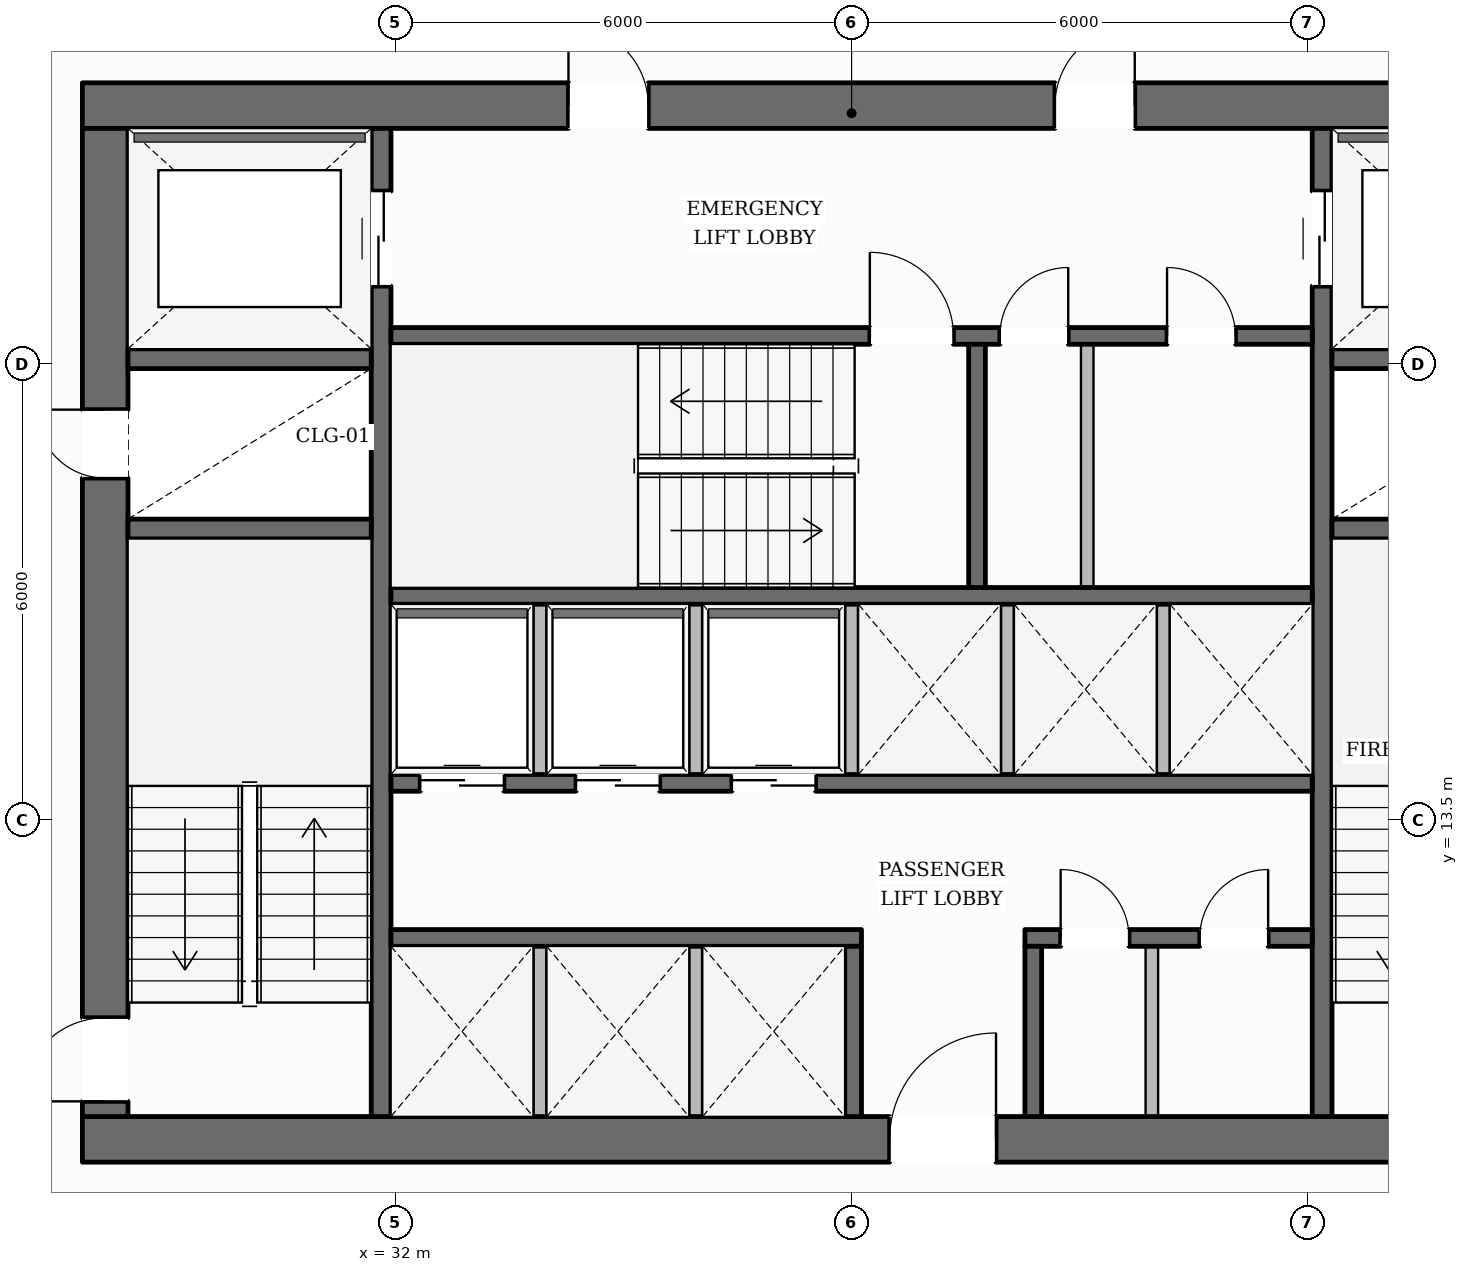
"""IFC4 building model, lengths in metres.
Left out: names, types, materials, properties, quantities, classifications, styles, units other than length and angle.
Written with IfcOpenShell. Run it as: python <this file> out.ifc"""

import sys

from ifc_helpers import new_model, si_unit, direction, frame, frame_2d, origin, place, context, subcontext, project, spatial, rectangle, extrude, element, fill, save


model = new_model("IFC4")
c1 = context("Model", 3, precision=1e-05, world=origin(), true_north=direction((0.0, 1.0)))
c2 = subcontext(c1, "Body", "Model", "MODEL_VIEW")
j1 = project(units=[si_unit("LENGTHUNIT", "METRE"), si_unit("PLANEANGLEUNIT", "RADIAN")], contexts=[c1])
p1 = place(None, origin())
s1 = spatial("IfcSite", under=j1, at=p1, CompositionType="ELEMENT")
p2 = place(p1, origin())
s2 = spatial("IfcBuilding", under=s1, at=p2, CompositionType="ELEMENT")
p3 = place(p2, frame((0.0, 0.0, 44.5)))
s3 = spatial("IfcBuildingStorey", under=s2, at=p3, CompositionType="ELEMENT", Elevation=44.5)
p4 = place(p3, frame((27.88, 9.3, 0.0), z_axis=(0.0, 0.0, 1.0), x_axis=(1.0, 0.0, 0.0)))
e1 = element("IfcWall", 1, at=p4, inside=s3, PredefinedType="SOLIDWALL", context=c2, shape_type="SweptSolid", body=[
    extrude(rectangle(XDim=20.24, YDim=0.6, at=frame_2d((10.12, 0.0))), origin(), (0.0, 0.0, 1.0), 3.59),
])
p5 = place(p4, frame((10.62, 0.0, 0.0)))
e2 = element("IfcOpeningElement", 2, at=p5, cuts=e1, PredefinedType="OPENING", context=c2, shape_type="SweptSolid", body=[
    extrude(rectangle(XDim=1.4, YDim=2.2, at=frame_2d((0.7, 1.1))), frame((0.0, 0.31, 0.0), z_axis=(0.0, -1.0, 0.0), x_axis=(1.0, 0.0, 0.0)), (0.0, 0.0, 1.0), 0.62),
])
p6 = place(p3, frame((27.88, 22.9, 0.0), z_axis=(0.0, 0.0, 1.0), x_axis=(1.0, 0.0, 0.0)))
e3 = element("IfcWall", 3, at=p6, inside=s3, PredefinedType="SOLIDWALL", context=c2, shape_type="SweptSolid", body=[
    extrude(rectangle(XDim=20.24, YDim=0.6, at=frame_2d((10.12, 0.0))), origin(), (0.0, 0.0, 1.0), 3.59),
])
p7 = place(p6, frame((6.395, 0.0, 0.0)))
e4 = element("IfcOpeningElement", 4, at=p7, cuts=e3, PredefinedType="OPENING", context=c2, shape_type="SweptSolid", body=[
    extrude(rectangle(XDim=1.05, YDim=2.15, at=frame_2d((0.525, 1.075))), frame((0.0, 0.31, 0.0), z_axis=(0.0, -1.0, 0.0), x_axis=(1.0, 0.0, 0.0)), (0.0, 0.0, 1.0), 0.62),
])
p8 = place(p6, frame((12.795, 0.0, 0.0)))
e5 = element("IfcOpeningElement", 5, at=p8, cuts=e3, PredefinedType="OPENING", context=c2, shape_type="SweptSolid", body=[
    extrude(rectangle(XDim=1.05, YDim=2.15, at=frame_2d((0.525, 1.075))), frame((0.0, 0.31, 0.0), z_axis=(0.0, -1.0, 0.0), x_axis=(1.0, 0.0, 0.0)), (0.0, 0.0, 1.0), 0.62),
])
p9 = place(p3, frame((28.18, 9.6, 0.0), z_axis=(0.0, 0.0, 1.0), x_axis=(0.0, 1.0, 0.0)))
e6 = element("IfcWall", 6, at=p9, inside=s3, PredefinedType="SOLIDWALL", context=c2, shape_type="SweptSolid", body=[
    extrude(rectangle(XDim=13.0, YDim=0.6, at=frame_2d((6.5, 0.0))), origin(), (0.0, 0.0, 1.0), 3.59),
])
p10 = place(p9, frame((0.2, 0.0, 0.0)))
e7 = element("IfcOpeningElement", 7, at=p10, cuts=e6, PredefinedType="OPENING", context=c2, shape_type="SweptSolid", body=[
    extrude(rectangle(XDim=1.1, YDim=2.15, at=frame_2d((0.55, 1.075))), frame((0.0, 0.31, 0.0), z_axis=(0.0, -1.0, 0.0), x_axis=(1.0, 0.0, 0.0)), (0.0, 0.0, 1.0), 0.62),
])
p11 = place(p9, frame((8.4, 0.0, 0.0)))
e8 = element("IfcOpeningElement", 8, at=p11, cuts=e6, PredefinedType="OPENING", context=c2, shape_type="SweptSolid", body=[
    extrude(rectangle(XDim=0.9, YDim=2.1, at=frame_2d((0.45, 1.05))), frame((0.0, 0.31, 0.0), z_axis=(0.0, -1.0, 0.0), x_axis=(1.0, 0.0, 0.0)), (0.0, 0.0, 1.0), 0.62),
])
p12 = place(p3, frame((31.81, 9.6, 0.0), z_axis=(0.0, 0.0, 1.0), x_axis=(0.0, 1.0, 0.0)))
e9 = element("IfcWall", 9, at=p12, inside=s3, PredefinedType="SHEAR", context=c2, shape_type="SweptSolid", body=[
    extrude(rectangle(XDim=13.0, YDim=0.26, at=frame_2d((6.5, 0.0))), origin(), (0.0, 0.0, 1.0), 3.59),
])
p13 = place(p12, frame((10.925, 0.0, 0.0)))
e10 = element("IfcOpeningElement", 10, at=p13, cuts=e9, PredefinedType="OPENING", context=c2, shape_type="SweptSolid", body=[
    extrude(rectangle(XDim=1.25, YDim=2.25, at=frame_2d((0.625, 1.125))), frame((0.0, 0.14, 0.0), z_axis=(0.0, -1.0, 0.0), x_axis=(1.0, 0.0, 0.0)), (0.0, 0.0, 1.0), 0.28),
])
p14 = place(p3, frame((44.19, 9.6, 0.0), z_axis=(0.0, 0.0, 1.0), x_axis=(0.0, 1.0, 0.0)))
e11 = element("IfcWall", 11, at=p14, inside=s3, PredefinedType="SHEAR", context=c2, shape_type="SweptSolid", body=[
    extrude(rectangle(XDim=13.0, YDim=0.26, at=frame_2d((6.5, 0.0))), origin(), (0.0, 0.0, 1.0), 3.59),
])
p15 = place(p14, frame((10.925, 0.0, 0.0)))
e12 = element("IfcOpeningElement", 12, at=p15, cuts=e11, PredefinedType="OPENING", context=c2, shape_type="SweptSolid", body=[
    extrude(rectangle(XDim=1.25, YDim=2.25, at=frame_2d((0.625, 1.125))), frame((0.0, 0.14, 0.0), z_axis=(0.0, -1.0, 0.0), x_axis=(1.0, 0.0, 0.0)), (0.0, 0.0, 1.0), 0.28),
])
for number, where, z_axis, x_axis in (
    (13, (28.48, 17.33, 0.0), (0.0, 0.0, 1.0), (1.0, 0.0, 0.0)),
    (14, (28.48, 19.57, 0.0), (0.0, 0.0, 1.0), (1.0, 0.0, 0.0)),
    (15, (44.32, 17.33, 0.0), (0.0, 0.0, 1.0), (1.0, 0.0, 0.0)),
    (16, (44.32, 19.57, 0.0), (0.0, 0.0, 1.0), (1.0, 0.0, 0.0)),
):
    element("IfcWall", number, at=place(p3, frame(where, z_axis=z_axis, x_axis=x_axis)), inside=s3, PredefinedType="SHEAR", context=c2, shape_type="SweptSolid", body=[
        extrude(rectangle(XDim=3.2, YDim=0.26, at=frame_2d((1.6, 0.0))), origin(), (0.0, 0.0, 1.0), 3.59),
    ])
p16 = place(p3, frame((31.94, 19.87, 0.0), z_axis=(0.0, 0.0, 1.0), x_axis=(1.0, 0.0, 0.0)))
e17 = element("IfcWall", 17, at=p16, inside=s3, PredefinedType="SOLIDWALL", context=c2, shape_type="SweptSolid", body=[
    extrude(rectangle(XDim=12.12, YDim=0.22, at=frame_2d((6.06, 0.0))), origin(), (0.0, 0.0, 1.0), 3.59),
])
p17 = place(p16, frame((6.3, 0.0, 0.0)))
e18 = element("IfcOpeningElement", 18, at=p17, cuts=e17, PredefinedType="OPENING", context=c2, shape_type="SweptSolid", body=[
    extrude(rectangle(XDim=1.1, YDim=2.15, at=frame_2d((0.55, 1.075))), frame((0.0, 0.12, 0.0), z_axis=(0.0, -1.0, 0.0), x_axis=(1.0, 0.0, 0.0)), (0.0, 0.0, 1.0), 0.24),
])
p18 = place(p16, frame((8.01, 0.0, 0.0)))
e19 = element("IfcOpeningElement", 19, at=p18, cuts=e17, PredefinedType="OPENING", context=c2, shape_type="SweptSolid", body=[
    extrude(rectangle(XDim=0.9, YDim=2.1, at=frame_2d((0.45, 1.05))), frame((0.0, 0.12, 0.0), z_axis=(0.0, -1.0, 0.0), x_axis=(1.0, 0.0, 0.0)), (0.0, 0.0, 1.0), 0.24),
])
p19 = place(p16, frame((10.21, 0.0, 0.0)))
e20 = element("IfcOpeningElement", 20, at=p19, cuts=e17, PredefinedType="OPENING", context=c2, shape_type="SweptSolid", body=[
    extrude(rectangle(XDim=0.9, YDim=2.1, at=frame_2d((0.45, 1.05))), frame((0.0, 0.12, 0.0), z_axis=(0.0, -1.0, 0.0), x_axis=(1.0, 0.0, 0.0)), (0.0, 0.0, 1.0), 0.24),
])
p20 = place(p3, frame((31.94, 16.45, 0.0), z_axis=(0.0, 0.0, 1.0), x_axis=(1.0, 0.0, 0.0)))
e21 = element("IfcWall", 21, at=p20, inside=s3, PredefinedType="SOLIDWALL", context=c2, shape_type="SweptSolid", body=[
    extrude(rectangle(XDim=12.12, YDim=0.22, at=frame_2d((6.06, 0.0))), origin(), (0.0, 0.0, 1.0), 3.59),
])
p21 = place(p3, frame((39.65, 16.56, 0.0), z_axis=(0.0, 0.0, 1.0), x_axis=(0.0, 1.0, 0.0)))
e22 = element("IfcWall", 22, at=p21, inside=s3, PredefinedType="SOLIDWALL", context=c2, shape_type="SweptSolid", body=[
    extrude(rectangle(XDim=3.2, YDim=0.22, at=frame_2d((1.6, 0.0))), origin(), (0.0, 0.0, 1.0), 3.59),
])
p22 = place(p3, frame((31.94, 13.99, 0.0), z_axis=(0.0, 0.0, 1.0), x_axis=(1.0, 0.0, 0.0)))
e23 = element("IfcWall", 23, at=p22, inside=s3, PredefinedType="SOLIDWALL", context=c2, shape_type="SweptSolid", body=[
    extrude(rectangle(XDim=12.12, YDim=0.22, at=frame_2d((6.06, 0.0))), origin(), (0.0, 0.0, 1.0), 3.59),
])
p23 = place(p22, frame((0.385, 0.0, 0.0)))
e24 = element("IfcOpeningElement", 24, at=p23, cuts=e23, PredefinedType="OPENING", context=c2, shape_type="SweptSolid", body=[
    extrude(rectangle(XDim=1.1, YDim=2.2, at=frame_2d((0.55, 1.1))), frame((0.0, 0.12, 0.0), z_axis=(0.0, -1.0, 0.0), x_axis=(1.0, 0.0, 0.0)), (0.0, 0.0, 1.0), 0.24),
])
p24 = place(p22, frame((2.435, 0.0, 0.0)))
e25 = element("IfcOpeningElement", 25, at=p24, cuts=e23, PredefinedType="OPENING", context=c2, shape_type="SweptSolid", body=[
    extrude(rectangle(XDim=1.1, YDim=2.2, at=frame_2d((0.55, 1.1))), frame((0.0, 0.12, 0.0), z_axis=(0.0, -1.0, 0.0), x_axis=(1.0, 0.0, 0.0)), (0.0, 0.0, 1.0), 0.24),
])
p25 = place(p22, frame((4.485, 0.0, 0.0)))
e26 = element("IfcOpeningElement", 26, at=p25, cuts=e23, PredefinedType="OPENING", context=c2, shape_type="SweptSolid", body=[
    extrude(rectangle(XDim=1.1, YDim=2.2, at=frame_2d((0.55, 1.1))), frame((0.0, 0.12, 0.0), z_axis=(0.0, -1.0, 0.0), x_axis=(1.0, 0.0, 0.0)), (0.0, 0.0, 1.0), 0.24),
])
p26 = place(p3, frame((31.94, 11.95, 0.0), z_axis=(0.0, 0.0, 1.0), x_axis=(1.0, 0.0, 0.0)))
e27 = element("IfcWall", 27, at=p26, inside=s3, PredefinedType="SOLIDWALL", context=c2, shape_type="SweptSolid", body=[
    extrude(rectangle(XDim=6.19, YDim=0.22, at=frame_2d((3.095, 0.0))), origin(), (0.0, 0.0, 1.0), 3.59),
])
p27 = place(p3, frame((40.28, 11.95, 0.0), z_axis=(0.0, 0.0, 1.0), x_axis=(1.0, 0.0, 0.0)))
e28 = element("IfcWall", 28, at=p27, inside=s3, PredefinedType="SOLIDWALL", context=c2, shape_type="SweptSolid", body=[
    extrude(rectangle(XDim=3.78, YDim=0.22, at=frame_2d((1.89, 0.0))), origin(), (0.0, 0.0, 1.0), 3.59),
])
p28 = place(p27, frame((0.47, 0.0, 0.0)))
e29 = element("IfcOpeningElement", 29, at=p28, cuts=e28, PredefinedType="OPENING", context=c2, shape_type="SweptSolid", body=[
    extrude(rectangle(XDim=0.9, YDim=2.1, at=frame_2d((0.45, 1.05))), frame((0.0, 0.12, 0.0), z_axis=(0.0, -1.0, 0.0), x_axis=(1.0, 0.0, 0.0)), (0.0, 0.0, 1.0), 0.24),
])
p29 = place(p27, frame((2.3, 0.0, 0.0)))
e30 = element("IfcOpeningElement", 30, at=p29, cuts=e28, PredefinedType="OPENING", context=c2, shape_type="SweptSolid", body=[
    extrude(rectangle(XDim=0.9, YDim=2.1, at=frame_2d((0.45, 1.05))), frame((0.0, 0.12, 0.0), z_axis=(0.0, -1.0, 0.0), x_axis=(1.0, 0.0, 0.0)), (0.0, 0.0, 1.0), 0.24),
])
for number, where, z_axis, x_axis in (
    (31, (38.02, 9.6, 0.0), (0.0, 0.0, 1.0), (0.0, 1.0, 0.0)),
    (32, (40.39, 9.6, 0.0), (0.0, 0.0, 1.0), (0.0, 1.0, 0.0)),
):
    element("IfcWall", number, at=place(p3, frame(where, z_axis=z_axis, x_axis=x_axis)), inside=s3, PredefinedType="SOLIDWALL", context=c2, shape_type="SweptSolid", body=[
        extrude(rectangle(XDim=2.24, YDim=0.22, at=frame_2d((1.12, 0.0))), origin(), (0.0, 0.0, 1.0), 3.59),
    ])
p30 = place(p3, frame((13.26, 14.434, 0.0), z_axis=(0.0, 0.0, 1.0), x_axis=(0.497388557453, 0.867527880194, 0.0)))
e33 = element("IfcWall", 33, at=p30, inside=s3, PredefinedType="STANDARD", context=c2, shape_type="SweptSolid", body=[
    extrude(rectangle(XDim=34.723, YDim=0.38, at=frame_2d((17.361, 0.0))), origin(), (0.0, 0.0, 1.0), 2.97),
])
p31 = place(p30, frame((30.604, 0.0, 0.65)))
e34 = element("IfcOpeningElement", 34, at=p31, cuts=e33, PredefinedType="OPENING", context=c2, shape_type="SweptSolid", body=[
    extrude(rectangle(XDim=1.65, YDim=1.75, at=frame_2d((0.825, 0.875))), frame((0.0, 0.2, 0.0), z_axis=(0.0, -1.0, 0.0), x_axis=(1.0, 0.0, 0.0)), (0.0, 0.0, 1.0), 0.4),
])
p32 = place(p30, frame((24.976, 0.0, 0.65)))
e35 = element("IfcOpeningElement", 35, at=p32, cuts=e33, PredefinedType="OPENING", context=c2, shape_type="SweptSolid", body=[
    extrude(rectangle(XDim=1.65, YDim=1.75, at=frame_2d((0.825, 0.875))), frame((0.0, 0.2, 0.0), z_axis=(0.0, -1.0, 0.0), x_axis=(1.0, 0.0, 0.0)), (0.0, 0.0, 1.0), 0.4),
])
p33 = place(p30, frame((13.721, 0.0, 0.65)))
e36 = element("IfcOpeningElement", 36, at=p33, cuts=e33, PredefinedType="OPENING", context=c2, shape_type="SweptSolid", body=[
    extrude(rectangle(XDim=1.65, YDim=1.75, at=frame_2d((0.825, 0.875))), frame((0.0, 0.2, 0.0), z_axis=(0.0, -1.0, 0.0), x_axis=(1.0, 0.0, 0.0)), (0.0, 0.0, 1.0), 0.4),
])
p34 = place(p30, frame((8.094, 0.0, 0.65)))
e37 = element("IfcOpeningElement", 37, at=p34, cuts=e33, PredefinedType="OPENING", context=c2, shape_type="SweptSolid", body=[
    extrude(rectangle(XDim=1.65, YDim=1.75, at=frame_2d((0.825, 0.875))), frame((0.0, 0.2, 0.0), z_axis=(0.0, -1.0, 0.0), x_axis=(1.0, 0.0, 0.0)), (0.0, 0.0, 1.0), 0.4),
])
p35 = place(p30, frame((2.466, 0.0, 0.65)))
e38 = element("IfcOpeningElement", 38, at=p35, cuts=e33, PredefinedType="OPENING", context=c2, shape_type="SweptSolid", body=[
    extrude(rectangle(XDim=1.65, YDim=1.75, at=frame_2d((0.825, 0.875))), frame((0.0, 0.2, 0.0), z_axis=(0.0, -1.0, 0.0), x_axis=(1.0, 0.0, 0.0)), (0.0, 0.0, 1.0), 0.4),
])
for number, where, z_axis, x_axis in (
    (39, (33.9, 9.6, 0.0), (0.0, 0.0, 1.0), (0.0, 1.0, 0.0)),
    (40, (35.95, 9.6, 0.0), (0.0, 0.0, 1.0), (0.0, 1.0, 0.0)),
    (41, (33.9, 14.1, 0.0), (0.0, 0.0, 1.0), (0.0, 1.0, 0.0)),
    (42, (35.95, 14.1, 0.0), (0.0, 0.0, 1.0), (0.0, 1.0, 0.0)),
    (43, (38.0, 14.1, 0.0), (0.0, 0.0, 1.0), (0.0, 1.0, 0.0)),
    (44, (40.05, 14.1, 0.0), (0.0, 0.0, 1.0), (0.0, 1.0, 0.0)),
    (45, (42.1, 14.1, 0.0), (0.0, 0.0, 1.0), (0.0, 1.0, 0.0)),
):
    element("IfcWall", number, at=place(p3, frame(where, z_axis=z_axis, x_axis=x_axis)), inside=s3, PredefinedType="PARTITIONING", context=c2, shape_type="SweptSolid", body=[
        extrude(rectangle(XDim=2.24, YDim=0.165, at=frame_2d((1.12, 0.0))), origin(), (0.0, 0.0, 1.0), 3.59),
    ])
p36 = place(p3, frame((41.1, 16.56, 0.0), z_axis=(0.0, 0.0, 1.0), x_axis=(0.0, 1.0, 0.0)))
e46 = element("IfcWall", 46, at=p36, inside=s3, PredefinedType="PARTITIONING", context=c2, shape_type="SweptSolid", body=[
    extrude(rectangle(XDim=3.2, YDim=0.165, at=frame_2d((1.6, 0.0))), origin(), (0.0, 0.0, 1.0), 3.59),
])
p37 = place(p3, frame((41.95, 9.6, 0.0), z_axis=(0.0, 0.0, 1.0), x_axis=(0.0, 1.0, 0.0)))
e47 = element("IfcWall", 47, at=p37, inside=s3, PredefinedType="PARTITIONING", context=c2, shape_type="SweptSolid", body=[
    extrude(rectangle(XDim=2.24, YDim=0.165, at=frame_2d((1.12, 0.0))), origin(), (0.0, 0.0, 1.0), 3.59),
])
p38 = place(p10, origin())
e48 = element("IfcDoor", 48, at=p38, inside=s3, OperationType="SINGLE_SWING_LEFT", PredefinedType="DOOR", context=c2, shape_type="SweptSolid", body=[
    extrude(rectangle(XDim=1.1, YDim=2.15, at=frame_2d((0.55, 1.075))), frame((0.0, 0.025, 0.0), z_axis=(0.0, -1.0, 0.0), x_axis=(1.0, 0.0, 0.0)), (0.0, 0.0, 1.0), 0.05),
])
fill(e7, e48)
p39 = place(p17, origin())
e49 = element("IfcDoor", 49, at=p39, inside=s3, OperationType="SINGLE_SWING_LEFT", PredefinedType="DOOR", context=c2, shape_type="SweptSolid", body=[
    extrude(rectangle(XDim=1.1, YDim=2.15, at=frame_2d((0.55, 1.075))), frame((0.0, 0.025, 0.0), z_axis=(0.0, -1.0, 0.0), x_axis=(1.0, 0.0, 0.0)), (0.0, 0.0, 1.0), 0.05),
])
fill(e18, e49)
p40 = place(p11, origin())
e50 = element("IfcDoor", 50, at=p40, inside=s3, OperationType="SINGLE_SWING_RIGHT", PredefinedType="DOOR", context=c2, shape_type="SweptSolid", body=[
    extrude(rectangle(XDim=0.9, YDim=2.1, at=frame_2d((0.45, 1.05))), frame((0.0, 0.025, 0.0), z_axis=(0.0, -1.0, 0.0), x_axis=(1.0, 0.0, 0.0)), (0.0, 0.0, 1.0), 0.05),
])
fill(e8, e50)
p41 = place(p7, origin())
e51 = element("IfcDoor", 51, at=p41, inside=s3, OperationType="SINGLE_SWING_LEFT", PredefinedType="DOOR", context=c2, shape_type="SweptSolid", body=[
    extrude(rectangle(XDim=1.05, YDim=2.15, at=frame_2d((0.525, 1.075))), frame((0.0, 0.025, 0.0), z_axis=(0.0, -1.0, 0.0), x_axis=(1.0, 0.0, 0.0)), (0.0, 0.0, 1.0), 0.05),
])
fill(e4, e51)
p42 = place(p8, origin())
e52 = element("IfcDoor", 52, at=p42, inside=s3, OperationType="SINGLE_SWING_RIGHT", PredefinedType="DOOR", context=c2, shape_type="SweptSolid", body=[
    extrude(rectangle(XDim=1.05, YDim=2.15, at=frame_2d((0.525, 1.075))), frame((0.0, 0.025, 0.0), z_axis=(0.0, -1.0, 0.0), x_axis=(1.0, 0.0, 0.0)), (0.0, 0.0, 1.0), 0.05),
])
fill(e5, e52)
p43 = place(p13, origin())
e53 = element("IfcDoor", 53, at=p43, inside=s3, OperationType="DOUBLE_DOOR_SLIDING", PredefinedType="DOOR", context=c2, shape_type="SweptSolid", body=[
    extrude(rectangle(XDim=1.25, YDim=2.25, at=frame_2d((0.625, 1.125))), frame((0.0, 0.025, 0.0), z_axis=(0.0, -1.0, 0.0), x_axis=(1.0, 0.0, 0.0)), (0.0, 0.0, 1.0), 0.05),
])
fill(e10, e53)
p44 = place(p15, origin())
e54 = element("IfcDoor", 54, at=p44, inside=s3, OperationType="DOUBLE_DOOR_SLIDING", PredefinedType="DOOR", context=c2, shape_type="SweptSolid", body=[
    extrude(rectangle(XDim=1.25, YDim=2.25, at=frame_2d((0.625, 1.125))), frame((0.0, 0.025, 0.0), z_axis=(0.0, -1.0, 0.0), x_axis=(1.0, 0.0, 0.0)), (0.0, 0.0, 1.0), 0.05),
])
fill(e12, e54)
p45 = place(p5, origin())
e55 = element("IfcDoor", 55, at=p45, inside=s3, OperationType="SINGLE_SWING_RIGHT", PredefinedType="DOOR", context=c2, shape_type="SweptSolid", body=[
    extrude(rectangle(XDim=1.4, YDim=2.2, at=frame_2d((0.7, 1.1))), frame((0.0, 0.025, 0.0), z_axis=(0.0, -1.0, 0.0), x_axis=(1.0, 0.0, 0.0)), (0.0, 0.0, 1.0), 0.05),
])
fill(e2, e55)
p46 = place(p23, origin())
e56 = element("IfcDoor", 56, at=p46, inside=s3, OperationType="DOUBLE_DOOR_SLIDING", PredefinedType="DOOR", context=c2, shape_type="SweptSolid", body=[
    extrude(rectangle(XDim=1.1, YDim=2.2, at=frame_2d((0.55, 1.1))), frame((0.0, 0.025, 0.0), z_axis=(0.0, -1.0, 0.0), x_axis=(1.0, 0.0, 0.0)), (0.0, 0.0, 1.0), 0.05),
])
fill(e24, e56)
p47 = place(p24, origin())
e57 = element("IfcDoor", 57, at=p47, inside=s3, OperationType="DOUBLE_DOOR_SLIDING", PredefinedType="DOOR", context=c2, shape_type="SweptSolid", body=[
    extrude(rectangle(XDim=1.1, YDim=2.2, at=frame_2d((0.55, 1.1))), frame((0.0, 0.025, 0.0), z_axis=(0.0, -1.0, 0.0), x_axis=(1.0, 0.0, 0.0)), (0.0, 0.0, 1.0), 0.05),
])
fill(e25, e57)
p48 = place(p25, origin())
e58 = element("IfcDoor", 58, at=p48, inside=s3, OperationType="DOUBLE_DOOR_SLIDING", PredefinedType="DOOR", context=c2, shape_type="SweptSolid", body=[
    extrude(rectangle(XDim=1.1, YDim=2.2, at=frame_2d((0.55, 1.1))), frame((0.0, 0.025, 0.0), z_axis=(0.0, -1.0, 0.0), x_axis=(1.0, 0.0, 0.0)), (0.0, 0.0, 1.0), 0.05),
])
fill(e26, e58)
p49 = place(p18, origin())
e59 = element("IfcDoor", 59, at=p49, inside=s3, OperationType="SINGLE_SWING_RIGHT", PredefinedType="DOOR", context=c2, shape_type="SweptSolid", body=[
    extrude(rectangle(XDim=0.9, YDim=2.1, at=frame_2d((0.45, 1.05))), frame((0.0, 0.025, 0.0), z_axis=(0.0, -1.0, 0.0), x_axis=(1.0, 0.0, 0.0)), (0.0, 0.0, 1.0), 0.05),
])
fill(e19, e59)
p50 = place(p19, origin())
e60 = element("IfcDoor", 60, at=p50, inside=s3, OperationType="SINGLE_SWING_LEFT", PredefinedType="DOOR", context=c2, shape_type="SweptSolid", body=[
    extrude(rectangle(XDim=0.9, YDim=2.1, at=frame_2d((0.45, 1.05))), frame((0.0, 0.025, 0.0), z_axis=(0.0, -1.0, 0.0), x_axis=(1.0, 0.0, 0.0)), (0.0, 0.0, 1.0), 0.05),
])
fill(e20, e60)
p51 = place(p28, origin())
e61 = element("IfcDoor", 61, at=p51, inside=s3, OperationType="SINGLE_SWING_LEFT", PredefinedType="DOOR", context=c2, shape_type="SweptSolid", body=[
    extrude(rectangle(XDim=0.9, YDim=2.1, at=frame_2d((0.45, 1.05))), frame((0.0, 0.025, 0.0), z_axis=(0.0, -1.0, 0.0), x_axis=(1.0, 0.0, 0.0)), (0.0, 0.0, 1.0), 0.05),
])
fill(e29, e61)
p52 = place(p29, origin())
e62 = element("IfcDoor", 62, at=p52, inside=s3, OperationType="SINGLE_SWING_RIGHT", PredefinedType="DOOR", context=c2, shape_type="SweptSolid", body=[
    extrude(rectangle(XDim=0.9, YDim=2.1, at=frame_2d((0.45, 1.05))), frame((0.0, 0.025, 0.0), z_axis=(0.0, -1.0, 0.0), x_axis=(1.0, 0.0, 0.0)), (0.0, 0.0, 1.0), 0.05),
])
fill(e30, e62)
save(model, sys.argv[1])
